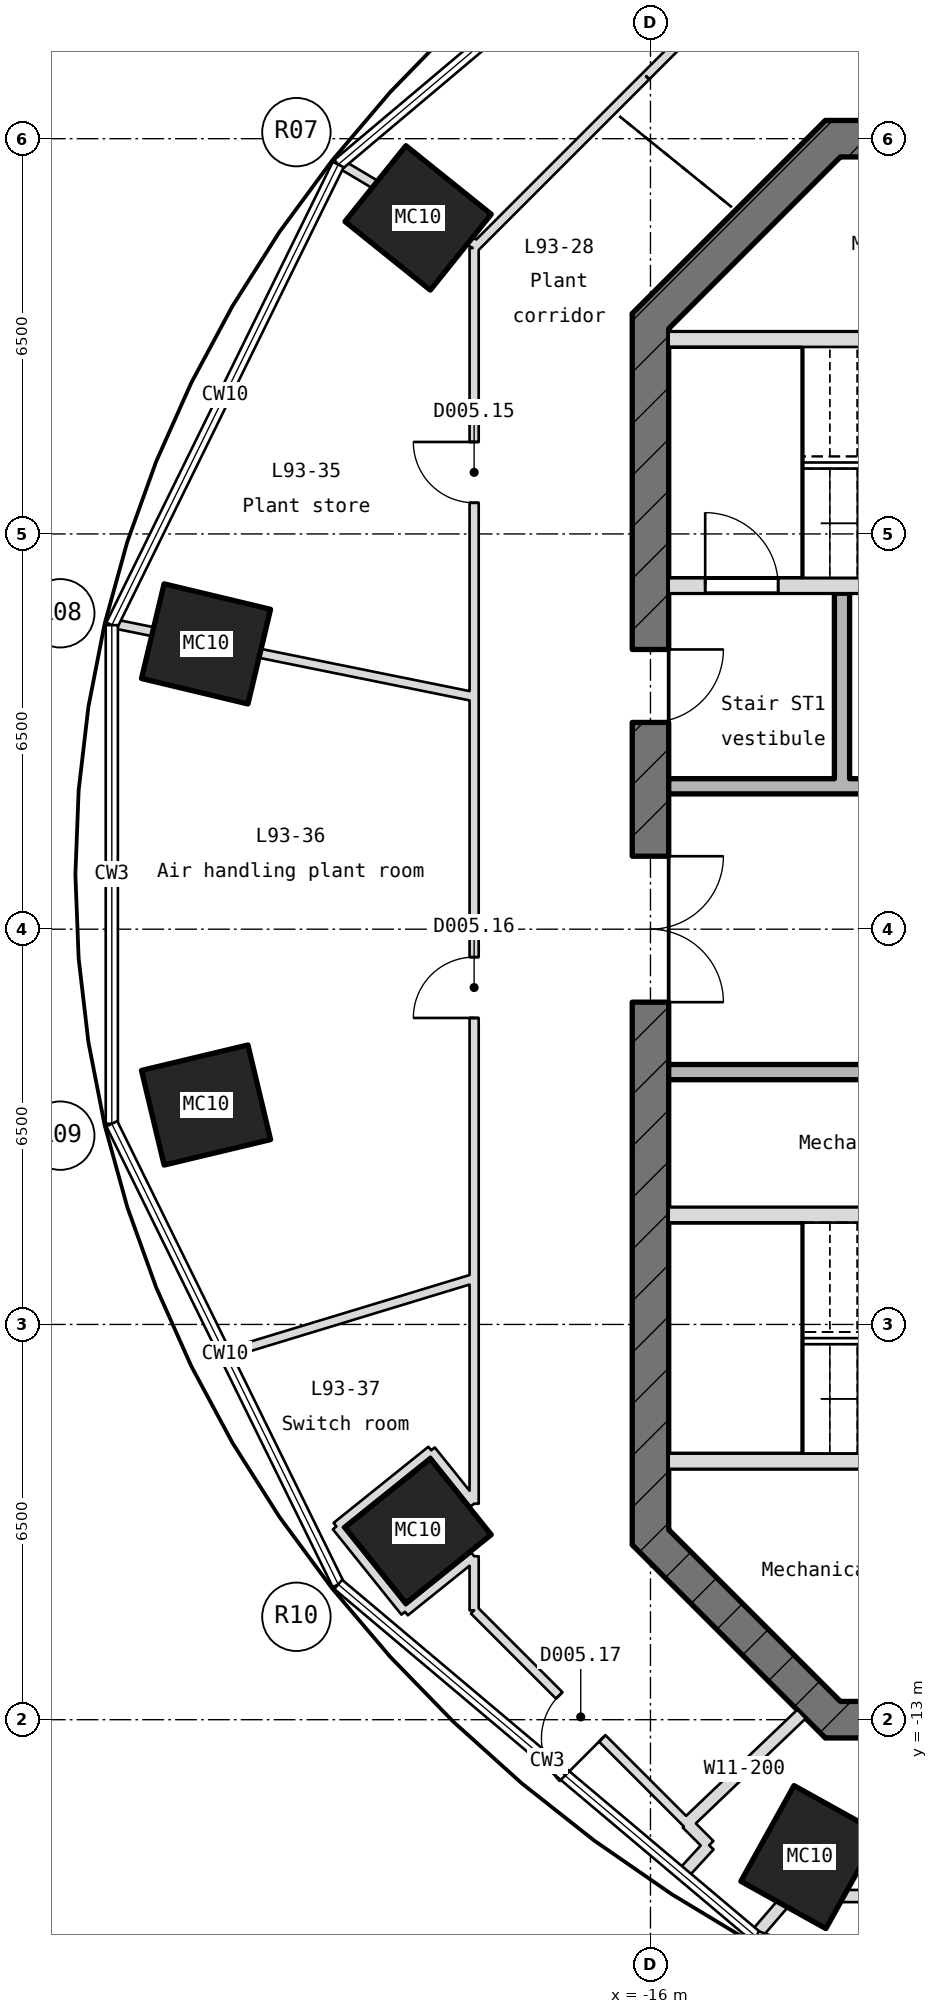
"""IFC4 building model, lengths in metres.
Left out: names, types, materials, properties, quantities, classifications, styles, units other than length and angle.
Written with IfcOpenShell. Run it as: python <this file> out.ifc"""

import sys

from ifc_helpers import new_model, si_unit, direction, frame, frame_2d, origin, origin_2d, place, context, subcontext, project, spatial, rectangle, hollow_rectangle, extrude, element, fill, save


model = new_model("IFC4")
c1 = context("Model", 3, precision=1e-05, world=origin(), true_north=direction((0.0, 1.0)))
c2 = subcontext(c1, "Body", "Model", "MODEL_VIEW")
j1 = project(units=[si_unit("LENGTHUNIT", "METRE"), si_unit("PLANEANGLEUNIT", "RADIAN")], contexts=[c1])
p1 = place(None, origin())
s1 = spatial("IfcSite", under=j1, at=p1, CompositionType="ELEMENT")
p2 = place(p1, origin())
s2 = spatial("IfcBuilding", under=s1, at=p2, CompositionType="ELEMENT")
p3 = place(p2, frame((0.0, 0.0, 413.55)))
s3 = spatial("IfcBuildingStorey", under=s2, at=p3, CompositionType="ELEMENT", Elevation=413.55)
for number, where, z_axis, x_axis in (
    (1, (-19.822, 11.698, -0.2), (0.0, 0.0, 1.0), (0.626, 0.78, 0.0)),
    (2, (-23.309, 4.692, -0.2), (0.0, 0.0, 1.0), (0.233, 0.973, 0.0)),
    (3, (-23.309, -2.892, -0.2), (0.0, 0.0, 1.0), (-0.233, 0.973, 0.0)),
    (4, (-19.822, -9.897, -0.2), (0.0, 0.0, 1.0), (-0.626, 0.78, 0.0)),
    (5, (-13.377, -15.26, -0.2), (0.0, 0.0, 1.0), (-0.874, 0.486, 0.0)),
):
    element("IfcColumn", number, at=place(p3, frame(where, z_axis=z_axis, x_axis=x_axis)), inside=s3, PredefinedType="COLUMN", context=c2, shape_type="SweptSolid", body=[
        extrude(hollow_rectangle(XDim=1.6, YDim=1.8, WallThickness=0.045, at=origin_2d()), origin(), (0.0, 0.0, 1.0), 5.0),
    ])
p4 = place(p3, frame((13.124, 13.0, -0.2), z_axis=(0.0, 0.0, 1.0), x_axis=(-1.0, 0.0, 0.0)))
e6 = element("IfcWall", 6, at=p4, inside=s3, PredefinedType="SHEAR", context=c2, shape_type="SweptSolid", body=[
    extrude(rectangle(XDim=26.249, YDim=0.6, at=frame_2d((13.124, 0.0))), origin(), (0.0, 0.0, 1.0), 5.0),
])
p5 = place(p4, frame((22.849, 0.0, 0.2)))
e7 = element("IfcOpeningElement", 7, at=p5, cuts=e6, PredefinedType="OPENING", context=c2, shape_type="SweptSolid", body=[
    extrude(rectangle(XDim=1.0, YDim=2.1, at=frame_2d((0.5, 1.05))), frame((0.0, 0.31, 0.0), z_axis=(0.0, -1.0, 0.0), x_axis=(1.0, 0.0, 0.0)), (0.0, 0.0, 1.0), 0.62),
])
p6 = place(p4, frame((17.624, 0.0, 0.2)))
e8 = element("IfcOpeningElement", 8, at=p6, cuts=e6, PredefinedType="OPENING", context=c2, shape_type="SweptSolid", body=[
    extrude(rectangle(XDim=1.0, YDim=2.1, at=frame_2d((0.5, 1.05))), frame((0.0, 0.31, 0.0), z_axis=(0.0, -1.0, 0.0), x_axis=(1.0, 0.0, 0.0)), (0.0, 0.0, 1.0), 0.62),
])
p7 = place(p4, frame((10.874, 0.0, 0.2)))
e9 = element("IfcOpeningElement", 9, at=p7, cuts=e6, PredefinedType="OPENING", context=c2, shape_type="SweptSolid", body=[
    extrude(rectangle(XDim=1.0, YDim=2.1, at=frame_2d((0.5, 1.05))), frame((0.0, 0.31, 0.0), z_axis=(0.0, -1.0, 0.0), x_axis=(1.0, 0.0, 0.0)), (0.0, 0.0, 1.0), 0.62),
])
p8 = place(p4, frame((3.436, 0.0, 0.2)))
e10 = element("IfcOpeningElement", 10, at=p8, cuts=e6, PredefinedType="OPENING", context=c2, shape_type="SweptSolid", body=[
    extrude(rectangle(XDim=1.0, YDim=2.1, at=frame_2d((0.5, 1.05))), frame((0.0, 0.31, 0.0), z_axis=(0.0, -1.0, 0.0), x_axis=(1.0, 0.0, 0.0)), (0.0, 0.0, 1.0), 0.62),
])
p9 = place(p3, frame((-12.912, 13.088, -0.2), z_axis=(0.0, 0.0, 1.0), x_axis=(-0.707106781187, -0.707106781187, 0.0)))
e11 = element("IfcWall", 11, at=p9, inside=s3, PredefinedType="SHEAR", context=c2, shape_type="SweptSolid", body=[
    extrude(rectangle(XDim=4.491, YDim=0.6, at=frame_2d((2.246, 0.0))), origin(), (0.0, 0.0, 1.0), 5.0),
])
p10 = place(p3, frame((-16.0, 10.124, -0.2), z_axis=(0.0, 0.0, 1.0), x_axis=(0.0, -1.0, 0.0)))
e12 = element("IfcWall", 12, at=p10, inside=s3, PredefinedType="SHEAR", context=c2, shape_type="SweptSolid", body=[
    extrude(rectangle(XDim=20.249, YDim=0.6, at=frame_2d((10.124, 0.0))), origin(), (0.0, 0.0, 1.0), 5.0),
])
p11 = place(p10, frame((8.924, 0.0, 0.2)))
e13 = element("IfcOpeningElement", 13, at=p11, cuts=e12, PredefinedType="OPENING", context=c2, shape_type="SweptSolid", body=[
    extrude(rectangle(XDim=2.4, YDim=2.1, at=frame_2d((1.2, 1.05))), frame((0.0, 0.31, 0.0), z_axis=(0.0, -1.0, 0.0), x_axis=(1.0, 0.0, 0.0)), (0.0, 0.0, 1.0), 0.62),
])
p12 = place(p10, frame((5.524, 0.0, 0.2)))
e14 = element("IfcOpeningElement", 14, at=p12, cuts=e12, PredefinedType="OPENING", context=c2, shape_type="SweptSolid", body=[
    extrude(rectangle(XDim=1.2, YDim=2.1, at=frame_2d((0.6, 1.05))), frame((0.0, 0.31, 0.0), z_axis=(0.0, -1.0, 0.0), x_axis=(1.0, 0.0, 0.0)), (0.0, 0.0, 1.0), 0.62),
])
p13 = place(p3, frame((-16.088, -9.912, -0.2), z_axis=(0.0, 0.0, 1.0), x_axis=(0.707106781187, -0.707106781187, 0.0)))
e15 = element("IfcWall", 15, at=p13, inside=s3, PredefinedType="SHEAR", context=c2, shape_type="SweptSolid", body=[
    extrude(rectangle(XDim=4.491, YDim=0.6, at=frame_2d((2.246, 0.0))), origin(), (0.0, 0.0, 1.0), 5.0),
])
p14 = place(p3, frame((-13.124, -13.0, -0.2), z_axis=(0.0, 0.0, 1.0), x_axis=(1.0, 0.0, 0.0)))
e16 = element("IfcWall", 16, at=p14, inside=s3, PredefinedType="SHEAR", context=c2, shape_type="SweptSolid", body=[
    extrude(rectangle(XDim=26.249, YDim=0.6, at=frame_2d((13.124, 0.0))), origin(), (0.0, 0.0, 1.0), 5.0),
])
p15 = place(p14, frame((2.824, 0.0, 0.2)))
e17 = element("IfcOpeningElement", 17, at=p15, cuts=e16, PredefinedType="OPENING", context=c2, shape_type="SweptSolid", body=[
    extrude(rectangle(XDim=1.2, YDim=2.1, at=frame_2d((0.6, 1.05))), frame((0.0, 0.31, 0.0), z_axis=(0.0, -1.0, 0.0), x_axis=(1.0, 0.0, 0.0)), (0.0, 0.0, 1.0), 0.62),
])
p16 = place(p14, frame((6.824, 0.0, 0.2)))
e18 = element("IfcOpeningElement", 18, at=p16, cuts=e16, PredefinedType="OPENING", context=c2, shape_type="SweptSolid", body=[
    extrude(rectangle(XDim=1.4, YDim=2.1, at=frame_2d((0.7, 1.05))), frame((0.0, 0.31, 0.0), z_axis=(0.0, -1.0, 0.0), x_axis=(1.0, 0.0, 0.0)), (0.0, 0.0, 1.0), 0.62),
])
p17 = place(p14, frame((15.424, 0.0, 0.2)))
e19 = element("IfcOpeningElement", 19, at=p17, cuts=e16, PredefinedType="OPENING", context=c2, shape_type="SweptSolid", body=[
    extrude(rectangle(XDim=1.4, YDim=2.1, at=frame_2d((0.7, 1.05))), frame((0.0, 0.31, 0.0), z_axis=(0.0, -1.0, 0.0), x_axis=(1.0, 0.0, 0.0)), (0.0, 0.0, 1.0), 0.62),
])
p18 = place(p3, frame((-15.7, -8.75, -0.2), z_axis=(0.0, 0.0, 1.0), x_axis=(1.0, 0.0, 0.0)))
e20 = element("IfcWall", 20, at=p18, inside=s3, PredefinedType="SHEAR", context=c2, shape_type="SweptSolid", body=[
    extrude(rectangle(XDim=7.15, YDim=0.25, at=frame_2d((3.575, 0.0))), origin(), (0.0, 0.0, 1.0), 5.0),
])
p19 = place(p18, frame((5.65, 0.0, 0.2)))
e21 = element("IfcOpeningElement", 21, at=p19, cuts=e20, PredefinedType="OPENING", context=c2, shape_type="SweptSolid", body=[
    extrude(rectangle(XDim=1.2, YDim=2.1, at=frame_2d((0.6, 1.05))), frame((0.0, 0.135, 0.0), z_axis=(0.0, -1.0, 0.0), x_axis=(1.0, 0.0, 0.0)), (0.0, 0.0, 1.0), 0.27),
])
p20 = place(p3, frame((-15.7, -4.7, -0.2), z_axis=(0.0, 0.0, 1.0), x_axis=(1.0, 0.0, 0.0)))
e22 = element("IfcWall", 22, at=p20, inside=s3, PredefinedType="SHEAR", context=c2, shape_type="SweptSolid", body=[
    extrude(rectangle(XDim=7.15, YDim=0.25, at=frame_2d((3.575, 0.0))), origin(), (0.0, 0.0, 1.0), 5.0),
])
for number, where, z_axis, x_axis in (
    (23, (-15.7, -2.35, 0.0), (0.0, 0.0, 1.0), (1.0, 0.0, 0.0)),
    (24, (-15.7, 2.35, 0.0), (0.0, 0.0, 1.0), (1.0, 0.0, 0.0)),
):
    element("IfcWall", number, at=place(p3, frame(where, z_axis=z_axis, x_axis=x_axis)), inside=s3, PredefinedType="STANDARD", context=c2, shape_type="SweptSolid", body=[
        extrude(rectangle(XDim=7.3, YDim=0.25, at=frame_2d((3.65, 0.0))), origin(), (0.0, 0.0, 1.0), 4.8),
    ])
p21 = place(p3, frame((-15.7, 5.65, -0.2), z_axis=(0.0, 0.0, 1.0), x_axis=(1.0, 0.0, 0.0)))
e25 = element("IfcWall", 25, at=p21, inside=s3, PredefinedType="SHEAR", context=c2, shape_type="SweptSolid", body=[
    extrude(rectangle(XDim=7.15, YDim=0.25, at=frame_2d((3.575, 0.0))), origin(), (0.0, 0.0, 1.0), 5.0),
])
p22 = place(p21, frame((0.6, 0.0, 0.2)))
e26 = element("IfcOpeningElement", 26, at=p22, cuts=e25, PredefinedType="OPENING", context=c2, shape_type="SweptSolid", body=[
    extrude(rectangle(XDim=1.2, YDim=2.1, at=frame_2d((0.6, 1.05))), frame((0.0, 0.135, 0.0), z_axis=(0.0, -1.0, 0.0), x_axis=(1.0, 0.0, 0.0)), (0.0, 0.0, 1.0), 0.27),
])
p23 = place(p3, frame((-15.7, 9.7, -0.2), z_axis=(0.0, 0.0, 1.0), x_axis=(1.0, 0.0, 0.0)))
e27 = element("IfcWall", 27, at=p23, inside=s3, PredefinedType="SHEAR", context=c2, shape_type="SweptSolid", body=[
    extrude(rectangle(XDim=7.15, YDim=0.25, at=frame_2d((3.575, 0.0))), origin(), (0.0, 0.0, 1.0), 5.0),
])
p24 = place(p3, frame((-12.85, 2.475, 0.0), z_axis=(0.0, 0.0, 1.0), x_axis=(0.0, 1.0, 0.0)))
e28 = element("IfcWall", 28, at=p24, inside=s3, PredefinedType="STANDARD", context=c2, shape_type="SweptSolid", body=[
    extrude(rectangle(XDim=3.05, YDim=0.25, at=frame_2d((1.525, 0.0))), origin(), (0.0, 0.0, 1.0), 4.8),
])
p25 = place(p3, frame((-22.978, -6.982, 0.0), z_axis=(0.0, 0.0, 1.0), x_axis=(0.956804908842, 0.290730745562, 0.0)))
e29 = element("IfcWall", 29, at=p25, inside=s3, PredefinedType="PARTITIONING", context=c2, shape_type="SweptSolid", body=[
    extrude(rectangle(XDim=4.262, YDim=0.15, at=frame_2d((2.131, 0.0))), origin(), (0.0, 0.0, 1.0), 4.8),
])
p26 = place(p3, frame((-20.038, -11.225, 0.0), z_axis=(0.0, 0.0, 1.0), x_axis=(0.779724809941, 0.626122368841, 0.0)))
e30 = element("IfcWall", 30, at=p26, inside=s3, PredefinedType="PARTITIONING", context=c2, shape_type="SweptSolid", body=[
    extrude(rectangle(XDim=1.459, YDim=0.15, at=frame_2d((0.729, 0.0))), origin(), (0.0, 0.0, 1.0), 4.8),
])
p27 = place(p3, frame((-21.165, -9.822, 0.0), z_axis=(0.0, 0.0, 1.0), x_axis=(0.779700462406, 0.626152688187, 0.0)))
e31 = element("IfcWall", 31, at=p27, inside=s3, PredefinedType="PARTITIONING", context=c2, shape_type="SweptSolid", body=[
    extrude(rectangle(XDim=2.0, YDim=0.15, at=frame_2d((1.0, 0.0))), origin(), (0.0, 0.0, 1.0), 4.8),
])
p28 = place(p3, frame((-18.9, 11.201, 0.0), z_axis=(0.0, 0.0, 1.0), x_axis=(0.707106781187, 0.707106781187, 0.0)))
e32 = element("IfcWall", 32, at=p28, inside=s3, PredefinedType="PARTITIONING", context=c2, shape_type="SweptSolid", body=[
    extrude(rectangle(XDim=3.999, YDim=0.15, at=frame_2d((2.0, 0.0))), origin(), (0.0, 0.0, 1.0), 4.8),
])
p29 = place(p3, frame((-16.072, 14.029, 0.0), z_axis=(0.0, 0.0, 1.0), x_axis=(0.707060644966, 0.707152914397, 0.0)))
e33 = element("IfcWall", 33, at=p29, inside=s3, PredefinedType="PARTITIONING", context=c2, shape_type="SweptSolid", body=[
    extrude(rectangle(XDim=2.646, YDim=0.15, at=frame_2d((1.323, 0.0))), origin(), (0.0, 0.0, 1.0), 4.338),
])
p30 = place(p3, frame((-18.9, -11.201, 0.0), z_axis=(0.0, 0.0, 1.0), x_axis=(0.0, 1.0, 0.0)))
e34 = element("IfcWall", 34, at=p30, inside=s3, PredefinedType="PARTITIONING", context=c2, shape_type="SweptSolid", body=[
    extrude(rectangle(XDim=0.89, YDim=0.15, at=frame_2d((0.445, 0.0))), origin(), (0.0, 0.0, 1.0), 4.8),
])
p31 = place(p3, frame((-18.9, -9.448, 0.0), z_axis=(0.0, 0.0, 1.0), x_axis=(0.0, 1.0, 0.0)))
e35 = element("IfcWall", 35, at=p31, inside=s3, PredefinedType="PARTITIONING", context=c2, shape_type="SweptSolid", body=[
    extrude(rectangle(XDim=20.649, YDim=0.15, at=frame_2d((10.325, 0.0))), origin(), (0.0, 0.0, 1.0), 4.8),
])
p32 = place(p31, frame((16.46, 0.0, 0.0)))
e36 = element("IfcOpeningElement", 36, at=p32, cuts=e35, PredefinedType="OPENING", context=c2, shape_type="SweptSolid", body=[
    extrude(rectangle(XDim=1.0, YDim=2.1, at=frame_2d((0.5, 1.05))), frame((0.0, 0.085, 0.0), z_axis=(0.0, -1.0, 0.0), x_axis=(1.0, 0.0, 0.0)), (0.0, 0.0, 1.0), 0.17),
])
p33 = place(p31, frame((7.988, 0.0, 0.0)))
e37 = element("IfcOpeningElement", 37, at=p33, cuts=e35, PredefinedType="OPENING", context=c2, shape_type="SweptSolid", body=[
    extrude(rectangle(XDim=1.0, YDim=2.1, at=frame_2d((0.5, 1.05))), frame((0.0, 0.085, 0.0), z_axis=(0.0, -1.0, 0.0), x_axis=(1.0, 0.0, 0.0)), (0.0, 0.0, 1.0), 0.17),
])
p34 = place(p3, frame((-18.9, -9.448, 0.0), z_axis=(0.0, 0.0, 1.0), x_axis=(-0.626094772893, 0.779746968802, 0.0)))
e38 = element("IfcWall", 38, at=p34, inside=s3, PredefinedType="PARTITIONING", context=c2, shape_type="SweptSolid", body=[
    extrude(rectangle(XDim=1.126, YDim=0.15, at=frame_2d((0.563, 0.0))), origin(), (0.0, 0.0, 1.0), 4.8),
])
p35 = place(p3, frame((-20.038, -11.225, 0.0), z_axis=(0.0, 0.0, 1.0), x_axis=(-0.626232147902, 0.779636644171, 0.0)))
e39 = element("IfcWall", 39, at=p35, inside=s3, PredefinedType="PARTITIONING", context=c2, shape_type="SweptSolid", body=[
    extrude(rectangle(XDim=1.8, YDim=0.15, at=frame_2d((0.9, 0.0))), origin(), (0.0, 0.0, 1.0), 4.8),
])
p36 = place(p3, frame((-15.397, -14.704, 0.0), z_axis=(0.0, 0.0, 1.0), x_axis=(-0.707082138597, 0.707131422917, 0.0)))
e40 = element("IfcWall", 40, at=p36, inside=s3, PredefinedType="PARTITIONING", context=c2, shape_type="SweptSolid", body=[
    extrude(rectangle(XDim=4.954, YDim=0.15, at=frame_2d((2.477, 0.0))), origin(), (0.0, 0.0, 1.0), 4.8),
])
p37 = place(p36, frame((1.974, 0.0, 0.0)))
e41 = element("IfcOpeningElement", 41, at=p37, cuts=e40, PredefinedType="OPENING", context=c2, shape_type="SweptSolid", body=[
    extrude(rectangle(XDim=1.0, YDim=2.1, at=frame_2d((0.5, 1.05))), frame((0.0, 0.085, 0.0), z_axis=(0.0, -1.0, 0.0), x_axis=(1.0, 0.0, 0.0)), (0.0, 0.0, 1.0), 0.17),
])
p38 = place(p3, frame((-18.854, 11.247, 0.0), z_axis=(0.0, 0.0, 1.0), x_axis=(-0.858770374849, 0.51236065743, 0.0)))
e42 = element("IfcWall", 42, at=p38, inside=s3, PredefinedType="PARTITIONING", context=c2, shape_type="SweptSolid", body=[
    extrude(rectangle(XDim=2.608, YDim=0.15, at=frame_2d((1.304, 0.0))), origin(), (0.0, 0.0, 1.0), 4.8),
])
p39 = place(p3, frame((-18.9, 3.824, 0.0), z_axis=(0.0, 0.0, 1.0), x_axis=(-0.980146495881, 0.198274674663, 0.0)))
e43 = element("IfcWall", 43, at=p39, inside=s3, PredefinedType="PARTITIONING", context=c2, shape_type="SweptSolid", body=[
    extrude(rectangle(XDim=3.653, YDim=0.15, at=frame_2d((1.827, 0.0))), origin(), (0.0, 0.0, 1.0), 4.383),
])
p40 = place(p3, frame((-22.481, 4.548, 0.0), z_axis=(0.0, 0.0, 1.0), x_axis=(-0.980118699547, 0.198412032898, 0.0)))
e44 = element("IfcWall", 44, at=p40, inside=s3, PredefinedType="PARTITIONING", context=c2, shape_type="SweptSolid", body=[
    extrude(rectangle(XDim=2.392, YDim=0.15, at=frame_2d((1.196, 0.0))), origin(), (0.0, 0.0, 1.0), 4.8),
])
p41 = place(p3, frame((-13.714, -15.9, 0.0), z_axis=(0.0, 0.0, 1.0), x_axis=(1.0, 0.0, 0.0)))
e45 = element("IfcWall", 45, at=p41, inside=s3, PredefinedType="PARTITIONING", context=c2, shape_type="SweptSolid", body=[
    extrude(rectangle(XDim=2.429, YDim=0.2, at=frame_2d((1.215, 0.0))), origin(), (0.0, 0.0, 1.0), 4.8),
])
p42 = place(p3, frame((-15.397, -14.704, 0.0), z_axis=(0.0, 0.0, 1.0), x_axis=(0.723206343498, 0.690632018317, 0.0)))
e46 = element("IfcWall", 46, at=p42, inside=s3, PredefinedType="PARTITIONING", context=c2, shape_type="SweptSolid", body=[
    extrude(rectangle(XDim=2.601, YDim=0.2, at=frame_2d((1.3, 0.0))), origin(), (0.0, 0.0, 1.0), 4.8),
])
p43 = place(p3, frame((-15.462, -15.53, 0.0), z_axis=(0.0, 0.0, 1.0), x_axis=(0.676443601068, 0.736494436214, 0.0)))
e47 = element("IfcWall", 47, at=p43, inside=s3, PredefinedType="PARTITIONING", context=c2, shape_type="SweptSolid", body=[
    extrude(rectangle(XDim=0.63, YDim=0.2, at=frame_2d((0.315, 0.0))), origin(), (0.0, 0.0, 1.0), 4.8),
])
p44 = place(p3, frame((-14.265, -16.539, 0.0), z_axis=(0.0, 0.0, 1.0), x_axis=(0.653099884045, 0.757271775164, 0.0)))
e48 = element("IfcWall", 48, at=p44, inside=s3, PredefinedType="PARTITIONING", context=c2, shape_type="SweptSolid", body=[
    extrude(rectangle(XDim=0.844, YDim=0.2, at=frame_2d((0.422, 0.0))), origin(), (0.0, 0.0, 1.0), 4.8),
])
p45 = place(p3, frame((-15.035, -15.066, 0.0), z_axis=(0.0, 0.0, 1.0), x_axis=(-0.707106781187, 0.707106781187, 0.0)))
e49 = element("IfcWall", 49, at=p45, inside=s3, PredefinedType="PARTITIONING", context=c2, shape_type="SweptSolid", body=[
    extrude(rectangle(XDim=0.515, YDim=0.2, at=frame_2d((0.257, 0.0))), origin(), (0.0, 0.0, 1.0), 4.8),
])
p46 = place(p22, origin())
e50 = element("IfcDoor", 50, at=p46, inside=s3, OperationType="SINGLE_SWING_RIGHT", PredefinedType="DOOR", context=c2, shape_type="SweptSolid", body=[
    extrude(rectangle(XDim=1.2, YDim=2.1, at=frame_2d((0.6, 1.05))), frame((0.0, 0.025, 0.0), z_axis=(0.0, -1.0, 0.0), x_axis=(1.0, 0.0, 0.0)), (0.0, 0.0, 1.0), 0.05),
])
fill(e26, e50)
p47 = place(p11, origin())
e51 = element("IfcDoor", 51, at=p47, inside=s3, OperationType="DOUBLE_DOOR_SINGLE_SWING", PredefinedType="DOOR", context=c2, shape_type="SweptSolid", body=[
    extrude(rectangle(XDim=2.4, YDim=2.1, at=frame_2d((1.2, 1.05))), frame((0.0, 0.025, 0.0), z_axis=(0.0, -1.0, 0.0), x_axis=(1.0, 0.0, 0.0)), (0.0, 0.0, 1.0), 0.05),
])
fill(e13, e51)
p48 = place(p12, origin())
e52 = element("IfcDoor", 52, at=p48, inside=s3, OperationType="SINGLE_SWING_RIGHT", PredefinedType="DOOR", context=c2, shape_type="SweptSolid", body=[
    extrude(rectangle(XDim=1.2, YDim=2.1, at=frame_2d((0.6, 1.05))), frame((0.0, 0.025, 0.0), z_axis=(0.0, -1.0, 0.0), x_axis=(1.0, 0.0, 0.0)), (0.0, 0.0, 1.0), 0.05),
])
fill(e14, e52)
p49 = place(p32, origin())
e53 = element("IfcDoor", 53, at=p49, inside=s3, OperationType="SINGLE_SWING_RIGHT", PredefinedType="DOOR", context=c2, shape_type="SweptSolid", body=[
    extrude(rectangle(XDim=1.0, YDim=2.1, at=frame_2d((0.5, 1.05))), frame((0.0, 0.025, 0.0), z_axis=(0.0, -1.0, 0.0), x_axis=(1.0, 0.0, 0.0)), (0.0, 0.0, 1.0), 0.05),
])
fill(e36, e53)
p50 = place(p33, origin())
e54 = element("IfcDoor", 54, at=p50, inside=s3, OperationType="SINGLE_SWING_RIGHT", PredefinedType="DOOR", context=c2, shape_type="SweptSolid", body=[
    extrude(rectangle(XDim=1.0, YDim=2.1, at=frame_2d((0.5, 1.05))), frame((0.0, 0.025, 0.0), z_axis=(0.0, -1.0, 0.0), x_axis=(1.0, 0.0, 0.0)), (0.0, 0.0, 1.0), 0.05),
])
fill(e37, e54)
p51 = place(p37, origin())
e55 = element("IfcDoor", 55, at=p51, inside=s3, OperationType="SINGLE_SWING_RIGHT", PredefinedType="DOOR", context=c2, shape_type="SweptSolid", body=[
    extrude(rectangle(XDim=1.0, YDim=2.1, at=frame_2d((0.5, 1.05))), frame((0.0, 0.025, 0.0), z_axis=(0.0, -1.0, 0.0), x_axis=(1.0, 0.0, 0.0)), (0.0, 0.0, 1.0), 0.05),
])
fill(e41, e55)
save(model, sys.argv[1])
